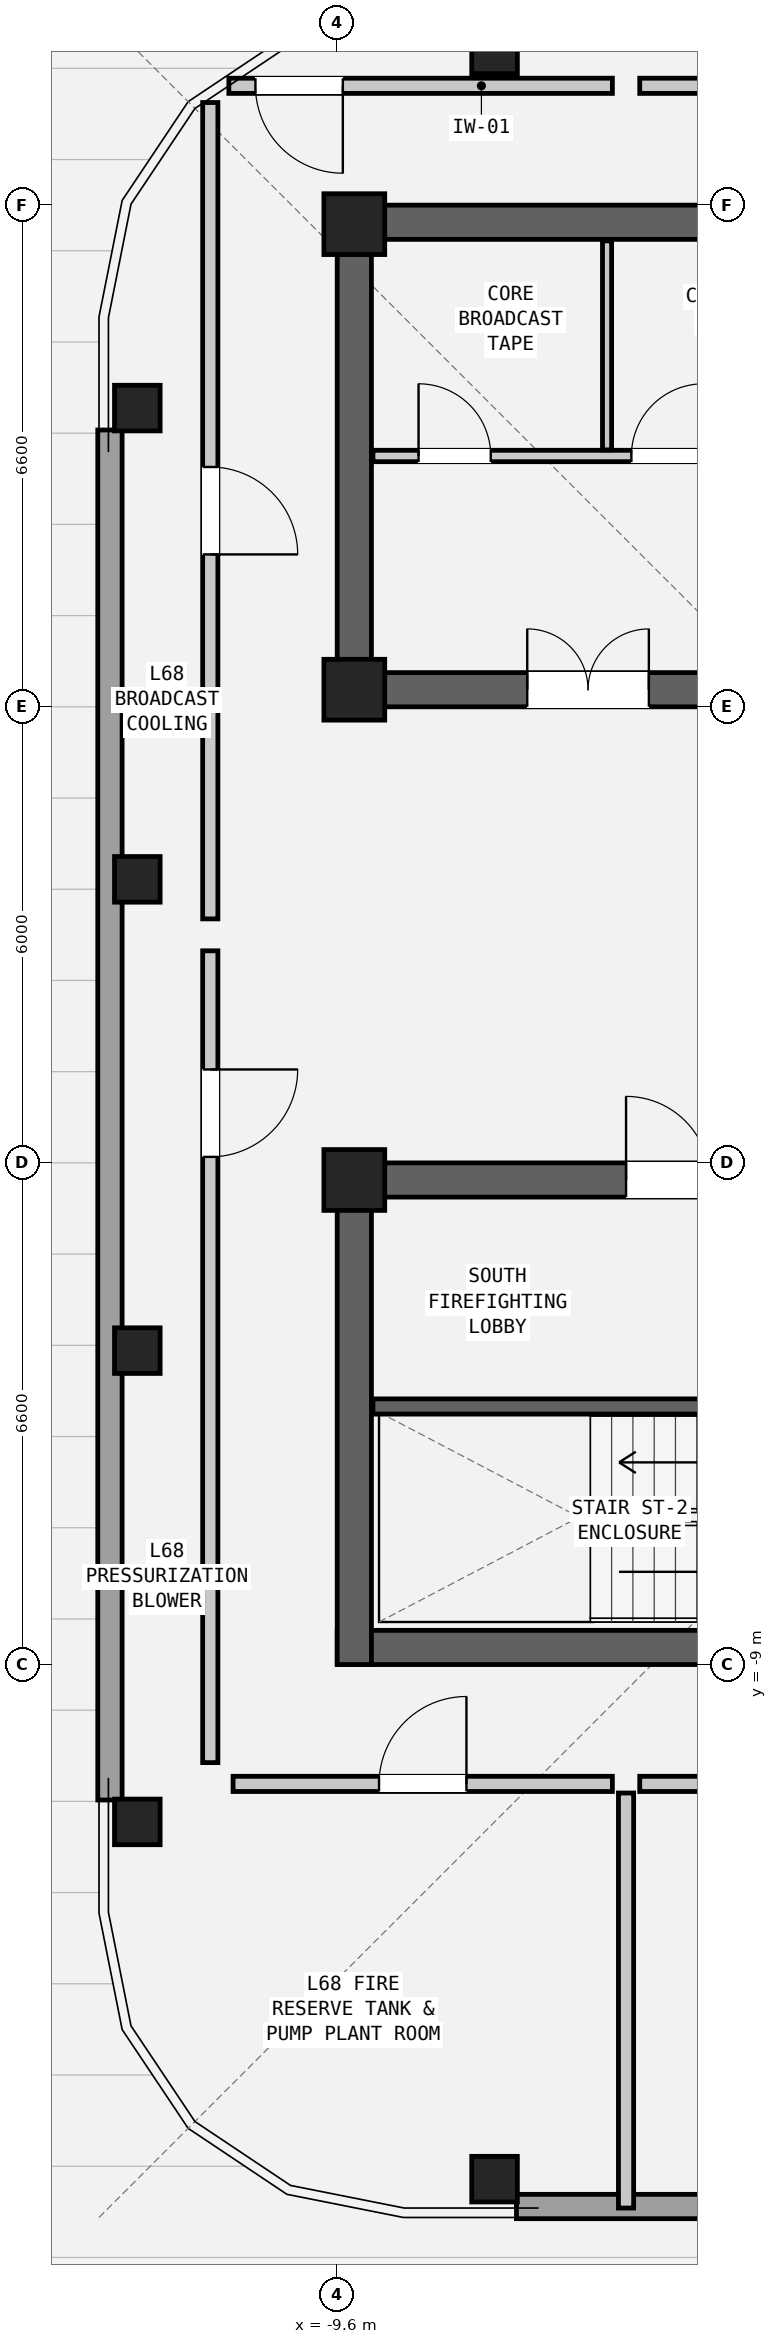
"""IFC4 building model, lengths in metres.
Left out: names, types, materials, properties, quantities, classifications, styles, units other than length and angle.
Written with IfcOpenShell. Run it as: python <this file> out.ifc"""

import sys

from ifc_helpers import new_model, si_unit, direction, frame, frame_2d, origin, origin_2d, place, context, subcontext, project, spatial, rectangle, hollow_rectangle, extrude, element, fill, save


model = new_model("IFC4")
c1 = context("Model", 3, precision=1e-05, world=origin(), true_north=direction((0.0, 1.0)))
c2 = subcontext(c1, "Body", "Model", "MODEL_VIEW")
j1 = project(units=[si_unit("LENGTHUNIT", "METRE"), si_unit("PLANEANGLEUNIT", "RADIAN")], contexts=[c1])
p1 = place(None, origin())
s1 = spatial("IfcSite", under=j1, at=p1, CompositionType="ELEMENT")
p2 = place(p1, origin())
s2 = spatial("IfcBuilding", under=s1, at=p2, CompositionType="ELEMENT")
p3 = place(p2, frame((0.0, 0.0, 231.3)))
s3 = spatial("IfcBuildingStorey", under=s2, at=p3, CompositionType="ELEMENT", Elevation=231.3)
p4 = place(p3, frame((-9.6, 9.975, 0.0), z_axis=(0.0, 0.0, 1.0), x_axis=(1.0, 0.0, 0.0)))
e1 = element("IfcWall", 1, at=p4, inside=s3, PredefinedType="SHEAR", context=c2, shape_type="SweptSolid", body=[
    extrude(rectangle(XDim=19.2, YDim=0.45, at=frame_2d((9.6, 0.0))), origin(), (0.0, 0.0, 1.0), 3.6),
])
p5 = place(p3, frame((-9.6, 3.825, 0.0), z_axis=(0.0, 0.0, 1.0), x_axis=(1.0, 0.0, 0.0)))
e2 = element("IfcWall", 2, at=p5, inside=s3, PredefinedType="SHEAR", context=c2, shape_type="SweptSolid", body=[
    extrude(rectangle(XDim=19.2, YDim=0.45, at=frame_2d((9.6, 0.0))), origin(), (0.0, 0.0, 1.0), 3.6),
])
p6 = place(p5, frame((14.2, 0.0, 0.0)))
e3 = element("IfcOpeningElement", 3, at=p6, cuts=e2, PredefinedType="OPENING", context=c2, shape_type="SweptSolid", body=[
    extrude(rectangle(XDim=1.1, YDim=2.08, at=frame_2d((0.55, 1.04))), frame((0.0, 0.237, 0.0), z_axis=(0.0, -1.0, 0.0), x_axis=(1.0, 0.0, 0.0)), (0.0, 0.0, 1.0), 0.474),
])
p7 = place(p5, frame((8.2, 0.0, 0.0)))
e4 = element("IfcOpeningElement", 4, at=p7, cuts=e2, PredefinedType="OPENING", context=c2, shape_type="SweptSolid", body=[
    extrude(rectangle(XDim=1.15, YDim=2.1, at=frame_2d((0.575, 1.05))), frame((0.0, 0.237, 0.0), z_axis=(0.0, -1.0, 0.0), x_axis=(1.0, 0.0, 0.0)), (0.0, 0.0, 1.0), 0.474),
])
p8 = place(p5, frame((2.5, 0.0, 0.0)))
e5 = element("IfcOpeningElement", 5, at=p8, cuts=e2, PredefinedType="OPENING", context=c2, shape_type="SweptSolid", body=[
    extrude(rectangle(XDim=1.6, YDim=2.12, at=frame_2d((0.8, 1.06))), frame((0.0, 0.237, 0.0), z_axis=(0.0, -1.0, 0.0), x_axis=(1.0, 0.0, 0.0)), (0.0, 0.0, 1.0), 0.474),
])
p9 = place(p3, frame((-9.375, 3.6, 0.0), z_axis=(0.0, 0.0, 1.0), x_axis=(0.0, 1.0, 0.0)))
e6 = element("IfcWall", 6, at=p9, inside=s3, PredefinedType="SHEAR", context=c2, shape_type="SweptSolid", body=[
    extrude(rectangle(XDim=6.6, YDim=0.45, at=frame_2d((3.3, 0.0))), origin(), (0.0, 0.0, 1.0), 3.6),
])
p10 = place(p3, frame((-9.6, -8.775, 0.0), z_axis=(0.0, 0.0, 1.0), x_axis=(1.0, 0.0, 0.0)))
e7 = element("IfcWall", 7, at=p10, inside=s3, PredefinedType="SHEAR", context=c2, shape_type="SweptSolid", body=[
    extrude(rectangle(XDim=19.2, YDim=0.45, at=frame_2d((9.6, 0.0))), origin(), (0.0, 0.0, 1.0), 3.6),
])
p11 = place(p3, frame((-9.6, -2.625, 0.0), z_axis=(0.0, 0.0, 1.0), x_axis=(1.0, 0.0, 0.0)))
e8 = element("IfcWall", 8, at=p11, inside=s3, PredefinedType="SHEAR", context=c2, shape_type="SweptSolid", body=[
    extrude(rectangle(XDim=19.2, YDim=0.45, at=frame_2d((9.6, 0.0))), origin(), (0.0, 0.0, 1.0), 3.6),
])
p12 = place(p11, frame((3.8, 0.0, 0.0)))
e9 = element("IfcOpeningElement", 9, at=p12, cuts=e8, PredefinedType="OPENING", context=c2, shape_type="SweptSolid", body=[
    extrude(rectangle(XDim=1.1, YDim=2.08, at=frame_2d((0.55, 1.04))), frame((0.0, 0.237, 0.0), z_axis=(0.0, -1.0, 0.0), x_axis=(1.0, 0.0, 0.0)), (0.0, 0.0, 1.0), 0.474),
])
p13 = place(p11, frame((10.15, 0.0, 0.0)))
e10 = element("IfcOpeningElement", 10, at=p13, cuts=e8, PredefinedType="OPENING", context=c2, shape_type="SweptSolid", body=[
    extrude(rectangle(XDim=0.9, YDim=2.05, at=frame_2d((0.45, 1.025))), frame((0.0, 0.237, 0.0), z_axis=(0.0, -1.0, 0.0), x_axis=(1.0, 0.0, 0.0)), (0.0, 0.0, 1.0), 0.474),
])
p14 = place(p11, frame((12.1, 0.0, 0.0)))
e11 = element("IfcOpeningElement", 11, at=p14, cuts=e8, PredefinedType="OPENING", context=c2, shape_type="SweptSolid", body=[
    extrude(rectangle(XDim=0.95, YDim=2.1, at=frame_2d((0.475, 1.05))), frame((0.0, 0.237, 0.0), z_axis=(0.0, -1.0, 0.0), x_axis=(1.0, 0.0, 0.0)), (0.0, 0.0, 1.0), 0.474),
])
p15 = place(p11, frame((14.8, 0.0, 0.0)))
e12 = element("IfcOpeningElement", 12, at=p15, cuts=e8, PredefinedType="OPENING", context=c2, shape_type="SweptSolid", body=[
    extrude(rectangle(XDim=1.6, YDim=2.12, at=frame_2d((0.8, 1.06))), frame((0.0, 0.237, 0.0), z_axis=(0.0, -1.0, 0.0), x_axis=(1.0, 0.0, 0.0)), (0.0, 0.0, 1.0), 0.474),
])
p16 = place(p3, frame((-9.375, -9.0, 0.0), z_axis=(0.0, 0.0, 1.0), x_axis=(0.0, 1.0, 0.0)))
e13 = element("IfcWall", 13, at=p16, inside=s3, PredefinedType="SHEAR", context=c2, shape_type="SweptSolid", body=[
    extrude(rectangle(XDim=6.6, YDim=0.45, at=frame_2d((3.3, 0.0))), origin(), (0.0, 0.0, 1.0), 3.6),
])
for number, where, z_axis, x_axis in (
    (14, (-7.53, -15.77, 0.0), (0.0, 0.0, 1.0), (1.0, 0.0, 0.0)),
    (15, (-7.53, 12.23, 0.0), (0.0, 0.0, 1.0), (1.0, 0.0, 0.0)),
    (16, (-12.23, 7.53, 0.0), (0.0, 0.0, 1.0), (0.0, 1.0, 0.0)),
    (17, (-12.23, 1.33, 0.0), (0.0, 0.0, 1.0), (0.0, 1.0, 0.0)),
    (18, (-12.23, -4.87, 0.0), (0.0, 0.0, 1.0), (0.0, 1.0, 0.0)),
    (19, (-12.23, -11.07, 0.0), (0.0, 0.0, 1.0), (0.0, 1.0, 0.0)),
):
    element("IfcColumn", number, at=place(p3, frame(where, z_axis=z_axis, x_axis=x_axis)), inside=s3, PredefinedType="COLUMN", context=c2, shape_type="SweptSolid", body=[
        extrude(hollow_rectangle(XDim=0.6, YDim=0.6, WallThickness=0.04, at=origin_2d()), origin(), (0.0, 0.0, 1.0), 3.6),
    ])
for number, where, z_axis, x_axis in (
    (20, (-9.375, 9.95, 0.0), (0.0, 0.0, 1.0), (1.0, 0.0, 0.0)),
    (21, (-9.375, 3.825, 0.0), (0.0, 0.0, 1.0), (1.0, 0.0, 0.0)),
    (22, (-9.375, -2.625, 0.0), (0.0, 0.0, 1.0), (1.0, 0.0, 0.0)),
):
    element("IfcColumn", number, at=place(p3, frame(where, z_axis=z_axis, x_axis=x_axis)), inside=s3, PredefinedType="COLUMN", context=c2, shape_type="SweptSolid", body=[
        extrude(rectangle(XDim=0.8, YDim=0.8, at=origin_2d()), origin(), (0.0, 0.0, 1.0), 3.6),
    ])
p17 = place(p3, frame((10.782, -16.13, 0.0), z_axis=(0.0, 0.0, 1.0), x_axis=(-1.0, 0.0, 0.0)))
e23 = element("IfcWall", 23, at=p17, inside=s3, PredefinedType="SOLIDWALL", context=c2, shape_type="SweptSolid", body=[
    extrude(rectangle(XDim=18.024, YDim=0.32, at=frame_2d((9.012, 0.0))), origin(), (0.0, 0.0, 1.0), 2.182),
])
p18 = place(p17, frame((2.753, 0.0, 0.0)))
e24 = element("IfcOpeningElement", 24, at=p18, cuts=e23, PredefinedType="OPENING", context=c2, shape_type="SweptSolid", body=[
    extrude(rectangle(XDim=1.25, YDim=2.02, at=frame_2d((0.625, 1.01))), frame((0.0, 0.172, 0.0), z_axis=(0.0, -1.0, 0.0), x_axis=(1.0, 0.0, 0.0)), (0.0, 0.0, 1.0), 0.344),
])
p19 = place(p3, frame((-12.59, -10.782, 0.0), z_axis=(0.0, 0.0, 1.0), x_axis=(0.0, 1.0, 0.0)))
e25 = element("IfcWall", 25, at=p19, inside=s3, PredefinedType="SOLIDWALL", context=c2, shape_type="SweptSolid", body=[
    extrude(rectangle(XDim=18.024, YDim=0.32, at=frame_2d((9.012, 0.0))), origin(), (0.0, 0.0, 1.0), 2.182),
])
p20 = place(p3, frame((-9.13, 6.9, 0.0), z_axis=(0.0, 0.0, 1.0), x_axis=(1.0, 0.0, 0.0)))
e26 = element("IfcWall", 26, at=p20, inside=s3, PredefinedType="PARTITIONING", context=c2, shape_type="SweptSolid", body=[
    extrude(rectangle(XDim=6.01, YDim=0.15, at=frame_2d((3.005, 0.0))), origin(), (0.0, 0.0, 1.0), 3.32),
])
p21 = place(p20, frame((0.6, 0.0, 0.0)))
e27 = element("IfcOpeningElement", 27, at=p21, cuts=e26, PredefinedType="OPENING", context=c2, shape_type="SweptSolid", body=[
    extrude(rectangle(XDim=0.95, YDim=2.1, at=frame_2d((0.475, 1.05))), frame((0.0, 0.087, 0.0), z_axis=(0.0, -1.0, 0.0), x_axis=(1.0, 0.0, 0.0)), (0.0, 0.0, 1.0), 0.174),
])
p22 = place(p20, frame((3.4, 0.0, 0.0)))
e28 = element("IfcOpeningElement", 28, at=p22, cuts=e26, PredefinedType="OPENING", context=c2, shape_type="SweptSolid", body=[
    extrude(rectangle(XDim=0.95, YDim=2.1, at=frame_2d((0.475, 1.05))), frame((0.0, 0.087, 0.0), z_axis=(0.0, -1.0, 0.0), x_axis=(1.0, 0.0, 0.0)), (0.0, 0.0, 1.0), 0.174),
])
p23 = place(p3, frame((-6.05, 6.98, 0.0), z_axis=(0.0, 0.0, 1.0), x_axis=(0.0, 1.0, 0.0)))
e29 = element("IfcWall", 29, at=p23, inside=s3, PredefinedType="PARTITIONING", context=c2, shape_type="SweptSolid", body=[
    extrude(rectangle(XDim=2.75, YDim=0.12, at=frame_2d((1.375, 0.0))), origin(), (0.0, 0.0, 1.0), 3.32),
])
p24 = place(p3, frame((-9.13, -5.605, 0.0), z_axis=(0.0, 0.0, 1.0), x_axis=(1.0, 0.0, 0.0)))
e30 = element("IfcWall", 30, at=p24, inside=s3, PredefinedType="SHEAR", context=c2, shape_type="SweptSolid", body=[
    extrude(rectangle(XDim=6.77, YDim=0.2, at=frame_2d((3.385, 0.0))), origin(), (0.0, 0.0, 1.0), 3.32),
])
p25 = place(p24, frame((5.5, 0.0, 0.0)))
e31 = element("IfcOpeningElement", 31, at=p25, cuts=e30, PredefinedType="OPENING", context=c2, shape_type="SweptSolid", body=[
    extrude(rectangle(XDim=1.05, YDim=2.08, at=frame_2d((0.525, 1.04))), frame((0.0, 0.112, 0.0), z_axis=(0.0, -1.0, 0.0), x_axis=(1.0, 0.0, 0.0)), (0.0, 0.0, 1.0), 0.224),
])
p26 = place(p3, frame((-5.98, 11.77, 0.0), z_axis=(0.0, 0.0, 1.0), x_axis=(-1.0, 0.0, 0.0)))
e32 = element("IfcWall", 32, at=p26, inside=s3, PredefinedType="PARTITIONING", context=c2, shape_type="SweptSolid", body=[
    extrude(rectangle(XDim=5.046, YDim=0.2, at=frame_2d((2.523, 0.0))), origin(), (0.0, 0.0, 1.0), 2.182),
])
p27 = place(p26, frame((3.546, 0.0, 0.0)))
e33 = element("IfcOpeningElement", 33, at=p27, cuts=e32, PredefinedType="OPENING", context=c2, shape_type="SweptSolid", body=[
    extrude(rectangle(XDim=1.15, YDim=2.1, at=frame_2d((0.575, 1.05))), frame((0.0, 0.112, 0.0), z_axis=(0.0, -1.0, 0.0), x_axis=(1.0, 0.0, 0.0)), (0.0, 0.0, 1.0), 0.224),
])
p28 = place(p3, frame((-0.53, 11.77, 0.0), z_axis=(0.0, 0.0, 1.0), x_axis=(-1.0, 0.0, 0.0)))
e34 = element("IfcWall", 34, at=p28, inside=s3, PredefinedType="PARTITIONING", context=c2, shape_type="SweptSolid", body=[
    extrude(rectangle(XDim=5.09, YDim=0.2, at=frame_2d((2.545, 0.0))), origin(), (0.0, 0.0, 1.0), 2.182),
])
p29 = place(p28, frame((1.97, 0.0, 0.0)))
e35 = element("IfcOpeningElement", 35, at=p29, cuts=e34, PredefinedType="OPENING", context=c2, shape_type="SweptSolid", body=[
    extrude(rectangle(XDim=1.15, YDim=2.1, at=frame_2d((0.575, 1.05))), frame((0.0, 0.112, 0.0), z_axis=(0.0, -1.0, 0.0), x_axis=(1.0, 0.0, 0.0)), (0.0, 0.0, 1.0), 0.224),
])
p30 = place(p3, frame((-10.97, -10.57, 0.0), z_axis=(0.0, 0.0, 1.0), x_axis=(1.0, 0.0, 0.0)))
e36 = element("IfcWall", 36, at=p30, inside=s3, PredefinedType="PARTITIONING", context=c2, shape_type="SweptSolid", body=[
    extrude(rectangle(XDim=4.99, YDim=0.2, at=frame_2d((2.495, 0.0))), origin(), (0.0, 0.0, 1.0), 3.32),
])
p31 = place(p30, frame((1.92, 0.0, 0.0)))
e37 = element("IfcOpeningElement", 37, at=p31, cuts=e36, PredefinedType="OPENING", context=c2, shape_type="SweptSolid", body=[
    extrude(rectangle(XDim=1.15, YDim=2.1, at=frame_2d((0.575, 1.05))), frame((0.0, 0.112, 0.0), z_axis=(0.0, -1.0, 0.0), x_axis=(1.0, 0.0, 0.0)), (0.0, 0.0, 1.0), 0.224),
])
p32 = place(p3, frame((-5.8, -16.15, 0.0), z_axis=(0.0, 0.0, 1.0), x_axis=(0.0, 1.0, 0.0)))
e38 = element("IfcWall", 38, at=p32, inside=s3, PredefinedType="PARTITIONING", context=c2, shape_type="SweptSolid", body=[
    extrude(rectangle(XDim=5.46, YDim=0.2, at=frame_2d((2.73, 0.0))), origin(), (0.0, 0.0, 1.0), 2.538),
])
p33 = place(p3, frame((-5.62, -10.57, 0.0), z_axis=(0.0, 0.0, 1.0), x_axis=(1.0, 0.0, 0.0)))
e39 = element("IfcWall", 39, at=p33, inside=s3, PredefinedType="PARTITIONING", context=c2, shape_type="SweptSolid", body=[
    extrude(rectangle(XDim=5.09, YDim=0.2, at=frame_2d((2.545, 0.0))), origin(), (0.0, 0.0, 1.0), 3.32),
])
p34 = place(p33, frame((1.99, 0.0, 0.0)))
e40 = element("IfcOpeningElement", 40, at=p34, cuts=e39, PredefinedType="OPENING", context=c2, shape_type="SweptSolid", body=[
    extrude(rectangle(XDim=1.15, YDim=2.1, at=frame_2d((0.575, 1.05))), frame((0.0, 0.112, 0.0), z_axis=(0.0, -1.0, 0.0), x_axis=(1.0, 0.0, 0.0)), (0.0, 0.0, 1.0), 0.224),
])
p35 = place(p3, frame((-11.27, 0.39, 0.0), z_axis=(0.0, 0.0, 1.0), x_axis=(0.0, -1.0, 0.0)))
e41 = element("IfcWall", 41, at=p35, inside=s3, PredefinedType="PARTITIONING", context=c2, shape_type="SweptSolid", body=[
    extrude(rectangle(XDim=10.68, YDim=0.2, at=frame_2d((5.34, 0.0))), origin(), (0.0, 0.0, 1.0), 3.32),
])
p36 = place(p35, frame((1.561, 0.0, 0.0)))
e42 = element("IfcOpeningElement", 42, at=p36, cuts=e41, PredefinedType="OPENING", context=c2, shape_type="SweptSolid", body=[
    extrude(rectangle(XDim=1.15, YDim=2.1, at=frame_2d((0.575, 1.05))), frame((0.0, 0.112, 0.0), z_axis=(0.0, -1.0, 0.0), x_axis=(1.0, 0.0, 0.0)), (0.0, 0.0, 1.0), 0.224),
])
p37 = place(p3, frame((-11.27, 11.55, 0.0), z_axis=(0.0, 0.0, 1.0), x_axis=(0.0, -1.0, 0.0)))
e43 = element("IfcWall", 43, at=p37, inside=s3, PredefinedType="PARTITIONING", context=c2, shape_type="SweptSolid", body=[
    extrude(rectangle(XDim=10.74, YDim=0.2, at=frame_2d((5.37, 0.0))), origin(), (0.0, 0.0, 1.0), 3.32),
])
p38 = place(p37, frame((4.795, 0.0, 0.0)))
e44 = element("IfcOpeningElement", 44, at=p38, cuts=e43, PredefinedType="OPENING", context=c2, shape_type="SweptSolid", body=[
    extrude(rectangle(XDim=1.15, YDim=2.1, at=frame_2d((0.575, 1.05))), frame((0.0, 0.112, 0.0), z_axis=(0.0, -1.0, 0.0), x_axis=(1.0, 0.0, 0.0)), (0.0, 0.0, 1.0), 0.224),
])
p39 = place(p8, origin())
e45 = element("IfcDoor", 45, at=p39, inside=s3, OperationType="DOUBLE_DOOR_SINGLE_SWING", PredefinedType="DOOR", context=c2, shape_type="SweptSolid", body=[
    extrude(rectangle(XDim=1.6, YDim=2.12, at=frame_2d((0.8, 1.06))), frame((0.0, 0.025, 0.0), z_axis=(0.0, -1.0, 0.0), x_axis=(1.0, 0.0, 0.0)), (0.0, 0.0, 1.0), 0.05),
])
fill(e5, e45)
p40 = place(p21, origin())
e46 = element("IfcDoor", 46, at=p40, inside=s3, OperationType="SINGLE_SWING_LEFT", PredefinedType="DOOR", context=c2, shape_type="SweptSolid", body=[
    extrude(rectangle(XDim=0.95, YDim=2.1, at=frame_2d((0.475, 1.05))), frame((0.0, 0.025, 0.0), z_axis=(0.0, -1.0, 0.0), x_axis=(1.0, 0.0, 0.0)), (0.0, 0.0, 1.0), 0.05),
])
fill(e27, e46)
p41 = place(p22, origin())
e47 = element("IfcDoor", 47, at=p41, inside=s3, OperationType="SINGLE_SWING_RIGHT", PredefinedType="DOOR", context=c2, shape_type="SweptSolid", body=[
    extrude(rectangle(XDim=0.95, YDim=2.1, at=frame_2d((0.475, 1.05))), frame((0.0, 0.025, 0.0), z_axis=(0.0, -1.0, 0.0), x_axis=(1.0, 0.0, 0.0)), (0.0, 0.0, 1.0), 0.05),
])
fill(e28, e47)
p42 = place(p12, origin())
e48 = element("IfcDoor", 48, at=p42, inside=s3, OperationType="SINGLE_SWING_LEFT", PredefinedType="DOOR", context=c2, shape_type="SweptSolid", body=[
    extrude(rectangle(XDim=1.1, YDim=2.08, at=frame_2d((0.55, 1.04))), frame((0.0, 0.025, 0.0), z_axis=(0.0, -1.0, 0.0), x_axis=(1.0, 0.0, 0.0)), (0.0, 0.0, 1.0), 0.05),
])
fill(e9, e48)
p43 = place(p27, origin())
e49 = element("IfcDoor", 49, at=p43, inside=s3, OperationType="SINGLE_SWING_LEFT", PredefinedType="DOOR", context=c2, shape_type="SweptSolid", body=[
    extrude(rectangle(XDim=1.15, YDim=2.1, at=frame_2d((0.575, 1.05))), frame((0.0, 0.025, 0.0), z_axis=(0.0, -1.0, 0.0), x_axis=(1.0, 0.0, 0.0)), (0.0, 0.0, 1.0), 0.05),
])
fill(e33, e49)
p44 = place(p31, origin())
e50 = element("IfcDoor", 50, at=p44, inside=s3, OperationType="SINGLE_SWING_RIGHT", PredefinedType="DOOR", context=c2, shape_type="SweptSolid", body=[
    extrude(rectangle(XDim=1.15, YDim=2.1, at=frame_2d((0.575, 1.05))), frame((0.0, 0.025, 0.0), z_axis=(0.0, -1.0, 0.0), x_axis=(1.0, 0.0, 0.0)), (0.0, 0.0, 1.0), 0.05),
])
fill(e37, e50)
p45 = place(p36, origin())
e51 = element("IfcDoor", 51, at=p45, inside=s3, OperationType="SINGLE_SWING_LEFT", PredefinedType="DOOR", context=c2, shape_type="SweptSolid", body=[
    extrude(rectangle(XDim=1.15, YDim=2.1, at=frame_2d((0.575, 1.05))), frame((0.0, 0.025, 0.0), z_axis=(0.0, -1.0, 0.0), x_axis=(1.0, 0.0, 0.0)), (0.0, 0.0, 1.0), 0.05),
])
fill(e42, e51)
p46 = place(p38, origin())
e52 = element("IfcDoor", 52, at=p46, inside=s3, OperationType="SINGLE_SWING_RIGHT", PredefinedType="DOOR", context=c2, shape_type="SweptSolid", body=[
    extrude(rectangle(XDim=1.15, YDim=2.1, at=frame_2d((0.575, 1.05))), frame((0.0, 0.025, 0.0), z_axis=(0.0, -1.0, 0.0), x_axis=(1.0, 0.0, 0.0)), (0.0, 0.0, 1.0), 0.05),
])
fill(e44, e52)
save(model, sys.argv[1])
